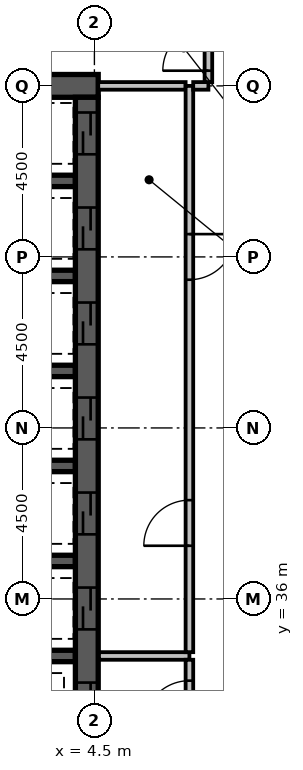
"""IFC4 building model, lengths in metres.
Left out: names, types, materials, properties, quantities, classifications, styles, units other than length and angle.
Written with IfcOpenShell. Run it as: python <this file> out.ifc"""

import sys

from ifc_helpers import new_model, si_unit, direction, frame, frame_2d, origin, place, context, subcontext, project, spatial, rectangle, extrude, element, fill, save


model = new_model("IFC4")
c1 = context("Model", 3, precision=1e-05, world=origin(), true_north=direction((0.0, 1.0)))
c2 = subcontext(c1, "Body", "Model", "MODEL_VIEW")
j1 = project(units=[si_unit("LENGTHUNIT", "METRE"), si_unit("PLANEANGLEUNIT", "RADIAN")], contexts=[c1])
p1 = place(None, origin())
s1 = spatial("IfcSite", under=j1, at=p1, CompositionType="ELEMENT")
p2 = place(p1, origin())
s2 = spatial("IfcBuilding", under=s1, at=p2, CompositionType="ELEMENT")
p3 = place(p2, frame((0.0, 0.0, 130.4)))
s3 = spatial("IfcBuildingStorey", under=s2, at=p3, CompositionType="ELEMENT", Elevation=130.4)
p4 = place(p3, frame((0.2, 49.5, -0.3), z_axis=(0.0, 0.0, 1.0), x_axis=(1.0, 0.0, 0.0)))
e1 = element("IfcWall", 1, at=p4, inside=s3, PredefinedType="SHEAR", context=c2, shape_type="SweptSolid", body=[
    extrude(rectangle(XDim=4.4, YDim=0.6, at=frame_2d((2.2, 0.0))), origin(), (0.0, 0.0, 1.0), 3.6),
])
for number, where, z_axis, x_axis in (
    (2, (0.8, 34.5, -0.3), (0.0, 0.0, 1.0), (1.0, 0.0, 0.0)),
    (3, (0.8, 37.0, -0.3), (0.0, 0.0, 1.0), (1.0, 0.0, 0.0)),
    (4, (0.8, 39.5, -0.3), (0.0, 0.0, 1.0), (1.0, 0.0, 0.0)),
    (5, (0.8, 42.0, -0.3), (0.0, 0.0, 1.0), (1.0, 0.0, 0.0)),
    (6, (0.8, 44.5, -0.3), (0.0, 0.0, 1.0), (1.0, 0.0, 0.0)),
    (7, (0.8, 47.0, -0.3), (0.0, 0.0, 1.0), (1.0, 0.0, 0.0)),
):
    element("IfcWall", number, at=place(p3, frame(where, z_axis=z_axis, x_axis=x_axis)), inside=s3, PredefinedType="SHEAR", context=c2, shape_type="SweptSolid", body=[
        extrude(rectangle(XDim=3.2, YDim=0.3, at=frame_2d((1.6, 0.0))), origin(), (0.0, 0.0, 1.0), 3.6),
    ])
p5 = place(p3, frame((4.3, 27.15, -0.3), z_axis=(0.0, 0.0, 1.0), x_axis=(0.0, 1.0, 0.0)))
e8 = element("IfcWall", 8, at=p5, inside=s3, PredefinedType="SHEAR", context=c2, shape_type="SweptSolid", body=[
    extrude(rectangle(XDim=22.05, YDim=0.6, at=frame_2d((11.025, 0.0))), origin(), (0.0, 0.0, 1.0), 3.6),
])
p6 = place(p5, frame((3.05, 0.0, 0.3)))
e9 = element("IfcOpeningElement", 9, at=p6, cuts=e8, PredefinedType="OPENING", context=c2, shape_type="SweptSolid", body=[
    extrude(rectangle(XDim=1.1, YDim=2.1, at=frame_2d((0.55, 1.05))), frame((0.0, 0.312, 0.0), z_axis=(0.0, -1.0, 0.0), x_axis=(1.0, 0.0, 0.0)), (0.0, 0.0, 1.0), 0.624),
])
p7 = place(p5, frame((0.55, 0.0, 0.3)))
e10 = element("IfcOpeningElement", 10, at=p7, cuts=e8, PredefinedType="OPENING", context=c2, shape_type="SweptSolid", body=[
    extrude(rectangle(XDim=1.1, YDim=2.1, at=frame_2d((0.55, 1.05))), frame((0.0, 0.312, 0.0), z_axis=(0.0, -1.0, 0.0), x_axis=(1.0, 0.0, 0.0)), (0.0, 0.0, 1.0), 0.624),
])
p8 = place(p5, frame((20.55, 0.0, 0.3)))
e11 = element("IfcOpeningElement", 11, at=p8, cuts=e8, PredefinedType="OPENING", context=c2, shape_type="SweptSolid", body=[
    extrude(rectangle(XDim=1.1, YDim=2.1, at=frame_2d((0.55, 1.05))), frame((0.0, 0.312, 0.0), z_axis=(0.0, -1.0, 0.0), x_axis=(1.0, 0.0, 0.0)), (0.0, 0.0, 1.0), 0.624),
])
p9 = place(p5, frame((18.05, 0.0, 0.3)))
e12 = element("IfcOpeningElement", 12, at=p9, cuts=e8, PredefinedType="OPENING", context=c2, shape_type="SweptSolid", body=[
    extrude(rectangle(XDim=1.1, YDim=2.1, at=frame_2d((0.55, 1.05))), frame((0.0, 0.312, 0.0), z_axis=(0.0, -1.0, 0.0), x_axis=(1.0, 0.0, 0.0)), (0.0, 0.0, 1.0), 0.624),
])
p10 = place(p5, frame((15.55, 0.0, 0.3)))
e13 = element("IfcOpeningElement", 13, at=p10, cuts=e8, PredefinedType="OPENING", context=c2, shape_type="SweptSolid", body=[
    extrude(rectangle(XDim=1.1, YDim=2.1, at=frame_2d((0.55, 1.05))), frame((0.0, 0.312, 0.0), z_axis=(0.0, -1.0, 0.0), x_axis=(1.0, 0.0, 0.0)), (0.0, 0.0, 1.0), 0.624),
])
p11 = place(p5, frame((13.05, 0.0, 0.3)))
e14 = element("IfcOpeningElement", 14, at=p11, cuts=e8, PredefinedType="OPENING", context=c2, shape_type="SweptSolid", body=[
    extrude(rectangle(XDim=1.1, YDim=2.1, at=frame_2d((0.55, 1.05))), frame((0.0, 0.312, 0.0), z_axis=(0.0, -1.0, 0.0), x_axis=(1.0, 0.0, 0.0)), (0.0, 0.0, 1.0), 0.624),
])
p12 = place(p5, frame((10.55, 0.0, 0.3)))
e15 = element("IfcOpeningElement", 15, at=p12, cuts=e8, PredefinedType="OPENING", context=c2, shape_type="SweptSolid", body=[
    extrude(rectangle(XDim=1.1, YDim=2.1, at=frame_2d((0.55, 1.05))), frame((0.0, 0.312, 0.0), z_axis=(0.0, -1.0, 0.0), x_axis=(1.0, 0.0, 0.0)), (0.0, 0.0, 1.0), 0.624),
])
p13 = place(p5, frame((8.05, 0.0, 0.3)))
e16 = element("IfcOpeningElement", 16, at=p13, cuts=e8, PredefinedType="OPENING", context=c2, shape_type="SweptSolid", body=[
    extrude(rectangle(XDim=1.1, YDim=2.1, at=frame_2d((0.55, 1.05))), frame((0.0, 0.312, 0.0), z_axis=(0.0, -1.0, 0.0), x_axis=(1.0, 0.0, 0.0)), (0.0, 0.0, 1.0), 0.624),
])
p14 = place(p5, frame((5.55, 0.0, 0.3)))
e17 = element("IfcOpeningElement", 17, at=p14, cuts=e8, PredefinedType="OPENING", context=c2, shape_type="SweptSolid", body=[
    extrude(rectangle(XDim=1.1, YDim=2.1, at=frame_2d((0.55, 1.05))), frame((0.0, 0.312, 0.0), z_axis=(0.0, -1.0, 0.0), x_axis=(1.0, 0.0, 0.0)), (0.0, 0.0, 1.0), 0.624),
])
p15 = place(p3, frame((4.62, 34.5, 0.0), z_axis=(0.0, 0.0, 1.0), x_axis=(1.0, 0.0, 0.0)))
e18 = element("IfcWall", 18, at=p15, inside=s3, PredefinedType="PARTITIONING", context=c2, shape_type="SweptSolid", body=[
    extrude(rectangle(XDim=2.38, YDim=0.2, at=frame_2d((1.19, 0.0))), origin(), (0.0, 0.0, 1.0), 3.3),
])
p16 = place(p3, frame((7.0, 34.6, 0.0), z_axis=(0.0, 0.0, 1.0), x_axis=(0.0, 1.0, 0.0)))
e19 = element("IfcWall", 19, at=p16, inside=s3, PredefinedType="PARTITIONING", context=c2, shape_type="SweptSolid", body=[
    extrude(rectangle(XDim=14.9, YDim=0.2, at=frame_2d((7.45, 0.0))), origin(), (0.0, 0.0, 1.0), 3.3),
])
p17 = place(p16, frame((2.8, 0.0, 0.0)))
e20 = element("IfcOpeningElement", 20, at=p17, cuts=e19, PredefinedType="OPENING", context=c2, shape_type="SweptSolid", body=[
    extrude(rectangle(XDim=1.2, YDim=2.1, at=frame_2d((0.6, 1.05))), frame((0.0, 0.112, 0.0), z_axis=(0.0, -1.0, 0.0), x_axis=(1.0, 0.0, 0.0)), (0.0, 0.0, 1.0), 0.224),
])
p18 = place(p16, frame((9.8, 0.0, 0.0)))
e21 = element("IfcOpeningElement", 21, at=p18, cuts=e19, PredefinedType="OPENING", context=c2, shape_type="SweptSolid", body=[
    extrude(rectangle(XDim=1.2, YDim=2.1, at=frame_2d((0.6, 1.05))), frame((0.0, 0.112, 0.0), z_axis=(0.0, -1.0, 0.0), x_axis=(1.0, 0.0, 0.0)), (0.0, 0.0, 1.0), 0.224),
])
p19 = place(p3, frame((4.6, 49.5, 0.0), z_axis=(0.0, 0.0, 1.0), x_axis=(1.0, 0.0, 0.0)))
e22 = element("IfcWall", 22, at=p19, inside=s3, PredefinedType="PARTITIONING", context=c2, shape_type="SweptSolid", body=[
    extrude(rectangle(XDim=2.3, YDim=0.2, at=frame_2d((1.15, 0.0))), origin(), (0.0, 0.0, 1.0), 3.3),
])
p20 = place(p3, frame((7.0, 32.1, 0.0), z_axis=(0.0, 0.0, 1.0), x_axis=(0.0, 1.0, 0.0)))
e23 = element("IfcWall", 23, at=p20, inside=s3, PredefinedType="PARTITIONING", context=c2, shape_type="SweptSolid", body=[
    extrude(rectangle(XDim=2.3, YDim=0.2, at=frame_2d((1.15, 0.0))), origin(), (0.0, 0.0, 1.0), 3.3),
])
p21 = place(p20, frame((0.55, 0.0, 0.0)))
e24 = element("IfcOpeningElement", 24, at=p21, cuts=e23, PredefinedType="OPENING", context=c2, shape_type="SweptSolid", body=[
    extrude(rectangle(XDim=1.2, YDim=2.1, at=frame_2d((0.6, 1.05))), frame((0.0, 0.112, 0.0), z_axis=(0.0, -1.0, 0.0), x_axis=(1.0, 0.0, 0.0)), (0.0, 0.0, 1.0), 0.224),
])
p22 = place(p3, frame((7.1, 49.5, 0.0), z_axis=(0.0, 0.0, 1.0), x_axis=(1.0, 0.0, 0.0)))
e25 = element("IfcWall", 25, at=p22, inside=s3, PredefinedType="PARTITIONING", context=c2, shape_type="SweptSolid", body=[
    extrude(rectangle(XDim=0.4, YDim=0.2, at=frame_2d((0.2, 0.0))), origin(), (0.0, 0.0, 1.0), 3.3),
])
p23 = place(p3, frame((7.5, 49.6, 0.0), z_axis=(0.0, 0.0, 1.0), x_axis=(0.0, 1.0, 0.0)))
e26 = element("IfcWall", 26, at=p23, inside=s3, PredefinedType="PARTITIONING", context=c2, shape_type="SweptSolid", body=[
    extrude(rectangle(XDim=3.9, YDim=0.2, at=frame_2d((1.95, 0.0))), origin(), (0.0, 0.0, 1.0), 3.3),
])
p24 = place(p23, frame((0.3, 0.0, 0.0)))
e27 = element("IfcOpeningElement", 27, at=p24, cuts=e26, PredefinedType="OPENING", context=c2, shape_type="SweptSolid", body=[
    extrude(rectangle(XDim=1.2, YDim=2.1, at=frame_2d((0.6, 1.05))), frame((0.0, 0.112, 0.0), z_axis=(0.0, -1.0, 0.0), x_axis=(1.0, 0.0, 0.0)), (0.0, 0.0, 1.0), 0.224),
])
p25 = place(p24, origin())
e28 = element("IfcDoor", 28, at=p25, inside=s3, OperationType="SINGLE_SWING_LEFT", PredefinedType="DOOR", context=c2, shape_type="SweptSolid", body=[
    extrude(rectangle(XDim=1.2, YDim=2.1, at=frame_2d((0.6, 1.05))), frame((0.0, 0.025, 0.0), z_axis=(0.0, -1.0, 0.0), x_axis=(1.0, 0.0, 0.0)), (0.0, 0.0, 1.0), 0.05),
])
fill(e27, e28)
p26 = place(p8, origin())
e29 = element("IfcDoor", 29, at=p26, inside=s3, OperationType="SLIDING_TO_LEFT", PredefinedType="DOOR", context=c2, shape_type="SweptSolid", body=[
    extrude(rectangle(XDim=1.1, YDim=2.1, at=frame_2d((0.55, 1.05))), frame((0.0, 0.025, 0.0), z_axis=(0.0, -1.0, 0.0), x_axis=(1.0, 0.0, 0.0)), (0.0, 0.0, 1.0), 0.05),
])
fill(e11, e29)
p27 = place(p9, origin())
e30 = element("IfcDoor", 30, at=p27, inside=s3, OperationType="SLIDING_TO_LEFT", PredefinedType="DOOR", context=c2, shape_type="SweptSolid", body=[
    extrude(rectangle(XDim=1.1, YDim=2.1, at=frame_2d((0.55, 1.05))), frame((0.0, 0.025, 0.0), z_axis=(0.0, -1.0, 0.0), x_axis=(1.0, 0.0, 0.0)), (0.0, 0.0, 1.0), 0.05),
])
fill(e12, e30)
p28 = place(p10, origin())
e31 = element("IfcDoor", 31, at=p28, inside=s3, OperationType="SLIDING_TO_LEFT", PredefinedType="DOOR", context=c2, shape_type="SweptSolid", body=[
    extrude(rectangle(XDim=1.1, YDim=2.1, at=frame_2d((0.55, 1.05))), frame((0.0, 0.025, 0.0), z_axis=(0.0, -1.0, 0.0), x_axis=(1.0, 0.0, 0.0)), (0.0, 0.0, 1.0), 0.05),
])
fill(e13, e31)
p29 = place(p11, origin())
e32 = element("IfcDoor", 32, at=p29, inside=s3, OperationType="SLIDING_TO_LEFT", PredefinedType="DOOR", context=c2, shape_type="SweptSolid", body=[
    extrude(rectangle(XDim=1.1, YDim=2.1, at=frame_2d((0.55, 1.05))), frame((0.0, 0.025, 0.0), z_axis=(0.0, -1.0, 0.0), x_axis=(1.0, 0.0, 0.0)), (0.0, 0.0, 1.0), 0.05),
])
fill(e14, e32)
p30 = place(p12, origin())
e33 = element("IfcDoor", 33, at=p30, inside=s3, OperationType="SLIDING_TO_LEFT", PredefinedType="DOOR", context=c2, shape_type="SweptSolid", body=[
    extrude(rectangle(XDim=1.1, YDim=2.1, at=frame_2d((0.55, 1.05))), frame((0.0, 0.025, 0.0), z_axis=(0.0, -1.0, 0.0), x_axis=(1.0, 0.0, 0.0)), (0.0, 0.0, 1.0), 0.05),
])
fill(e15, e33)
p31 = place(p13, origin())
e34 = element("IfcDoor", 34, at=p31, inside=s3, OperationType="SLIDING_TO_LEFT", PredefinedType="DOOR", context=c2, shape_type="SweptSolid", body=[
    extrude(rectangle(XDim=1.1, YDim=2.1, at=frame_2d((0.55, 1.05))), frame((0.0, 0.025, 0.0), z_axis=(0.0, -1.0, 0.0), x_axis=(1.0, 0.0, 0.0)), (0.0, 0.0, 1.0), 0.05),
])
fill(e16, e34)
p32 = place(p17, origin())
e35 = element("IfcDoor", 35, at=p32, inside=s3, OperationType="SINGLE_SWING_LEFT", PredefinedType="DOOR", context=c2, shape_type="SweptSolid", body=[
    extrude(rectangle(XDim=1.2, YDim=2.1, at=frame_2d((0.6, 1.05))), frame((0.0, 0.025, 0.0), z_axis=(0.0, -1.0, 0.0), x_axis=(1.0, 0.0, 0.0)), (0.0, 0.0, 1.0), 0.05),
])
fill(e20, e35)
p33 = place(p18, origin())
e36 = element("IfcDoor", 36, at=p33, inside=s3, OperationType="SINGLE_SWING_RIGHT", PredefinedType="DOOR", context=c2, shape_type="SweptSolid", body=[
    extrude(rectangle(XDim=1.2, YDim=2.1, at=frame_2d((0.6, 1.05))), frame((0.0, 0.025, 0.0), z_axis=(0.0, -1.0, 0.0), x_axis=(1.0, 0.0, 0.0)), (0.0, 0.0, 1.0), 0.05),
])
fill(e21, e36)
p34 = place(p21, origin())
e37 = element("IfcDoor", 37, at=p34, inside=s3, OperationType="SINGLE_SWING_LEFT", PredefinedType="DOOR", context=c2, shape_type="SweptSolid", body=[
    extrude(rectangle(XDim=1.2, YDim=2.1, at=frame_2d((0.6, 1.05))), frame((0.0, 0.025, 0.0), z_axis=(0.0, -1.0, 0.0), x_axis=(1.0, 0.0, 0.0)), (0.0, 0.0, 1.0), 0.05),
])
fill(e24, e37)
p35 = place(p14, origin())
e38 = element("IfcDoor", 38, at=p35, inside=s3, OperationType="SLIDING_TO_LEFT", PredefinedType="DOOR", context=c2, shape_type="SweptSolid", body=[
    extrude(rectangle(XDim=1.1, YDim=2.1, at=frame_2d((0.55, 1.05))), frame((0.0, 0.025, 0.0), z_axis=(0.0, -1.0, 0.0), x_axis=(1.0, 0.0, 0.0)), (0.0, 0.0, 1.0), 0.05),
])
fill(e17, e38)
save(model, sys.argv[1])
